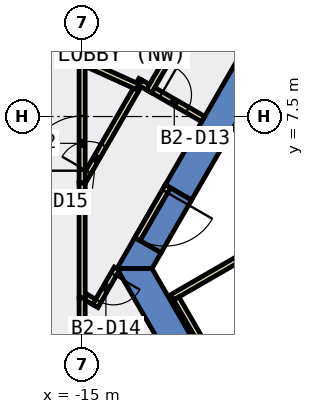
"""IFC4 building model, lengths in metres.
Left out: names, types, materials, properties, quantities, classifications, styles, units other than length and angle.
Written with IfcOpenShell. Run it as: python <this file> out.ifc"""

import sys

from ifc_helpers import new_model, si_unit, direction, frame, frame_2d, origin, place, context, subcontext, project, spatial, polyline, rectangle, outline, extrude, element, fill, save


model = new_model("IFC4")
c1 = context("Model", 3, precision=1e-05, world=origin(), true_north=direction((0.0, 1.0)))
c2 = subcontext(c1, "Body", "Model", "MODEL_VIEW")
j1 = project(units=[si_unit("LENGTHUNIT", "METRE"), si_unit("PLANEANGLEUNIT", "RADIAN")], contexts=[c1])
p1 = place(None, origin())
s1 = spatial("IfcSite", under=j1, at=p1, CompositionType="ELEMENT")
p2 = place(p1, origin())
s2 = spatial("IfcBuilding", under=s1, at=p2, CompositionType="ELEMENT")
p3 = place(p2, frame((0.0, 0.0, -11.0)))
s3 = spatial("IfcBuildingStorey", under=s2, at=p3, CompositionType="ELEMENT", Elevation=-11.0)
p4 = place(p3, frame((0.0, 0.0, -0.42)))
e1 = element("IfcWall", 1, at=p4, inside=s3, PredefinedType="SHEAR", context=c2, shape_type="SweptSolid", body=[
    extrude(outline(polyline([(-12.267, 5.252), (-11.402, 4.752), (-6.351, 13.5), (-6.928, 14.5), (-12.267, 5.252)])), origin(), (0.0, 0.0, 1.0), 5.5),
])
p5 = place(p3, frame((0.0, 0.0, -0.42)))
e2 = element("IfcWall", 2, at=p5, inside=s3, PredefinedType="SHEAR", context=c2, shape_type="SweptSolid", body=[
    extrude(outline(polyline([(-12.402, 3.02), (-13.267, 3.52), (-13.856, 2.5), (-12.702, 2.5), (-12.402, 3.02)])), origin(), (0.0, 0.0, 1.0), 5.5),
])
p6 = place(p3, frame((0.0, 0.0, 3.6)))
e3 = element("IfcWall", 3, at=p6, inside=s3, PredefinedType="SHEAR", context=c2, shape_type="SweptSolid", body=[
    extrude(outline(polyline([(-13.267, 3.52), (-12.402, 3.02), (-11.402, 4.752), (-12.267, 5.252), (-13.267, 3.52)])), origin(), (0.0, 0.0, 1.0), 1.48),
])
p7 = place(p3, frame((0.0, 0.0, -0.42)))
e4 = element("IfcWall", 4, at=p7, inside=s3, PredefinedType="SHEAR", context=c2, shape_type="SweptSolid", body=[
    extrude(outline(polyline([(-13.856, 2.5), (-6.928, -9.5), (-6.351, -8.5), (-12.702, 2.5), (-13.856, 2.5)])), origin(), (0.0, 0.0, 1.0), 5.5),
])
p8 = place(p3, frame((-12.749, 8.417, 0.0), z_axis=(0.0, 0.0, 1.0), x_axis=(0.866010750942, -0.50002537861, 0.0)))
e5 = element("IfcWall", 5, at=p8, inside=s3, PredefinedType="PARTITIONING", context=c2, shape_type="SweptSolid", body=[
    extrude(rectangle(XDim=2.0, YDim=0.2, at=frame_2d((1.0, 0.0))), origin(), (0.0, 0.0, 1.0), 5.05),
])
p9 = place(p8, frame((0.4, 0.0, 0.0)))
e6 = element("IfcOpeningElement", 6, at=p9, cuts=e5, PredefinedType="OPENING", context=c2, shape_type="SweptSolid", body=[
    extrude(rectangle(XDim=1.0, YDim=2.1, at=frame_2d((0.5, 1.05))), frame((0.0, 0.11, 0.0), z_axis=(0.0, -1.0, 0.0), x_axis=(1.0, 0.0, 0.0)), (0.0, 0.0, 1.0), 0.22),
])
p10 = place(p3, frame((-13.856, 2.5, 0.0), z_axis=(0.0, 0.0, 1.0), x_axis=(-0.499831418649, -0.866122712398, 0.0)))
e7 = element("IfcWall", 7, at=p10, inside=s3, PredefinedType="PARTITIONING", context=c2, shape_type="SweptSolid", body=[
    extrude(rectangle(XDim=1.422, YDim=0.2, at=frame_2d((0.711, 0.0))), origin(), (0.0, 0.0, 1.0), 5.05),
])
p11 = place(p10, frame((0.224, 0.0, 0.0)))
e8 = element("IfcOpeningElement", 8, at=p11, cuts=e7, PredefinedType="OPENING", context=c2, shape_type="SweptSolid", body=[
    extrude(rectangle(XDim=1.0, YDim=2.1, at=frame_2d((0.5, 1.05))), frame((0.0, 0.11, 0.0), z_axis=(0.0, -1.0, 0.0), x_axis=(1.0, 0.0, 0.0)), (0.0, 0.0, 1.0), 0.22),
])
p12 = place(p3, frame((-14.604, 1.405, 0.0), z_axis=(0.0, 0.0, 1.0), x_axis=(-0.865410684717, 0.501063216349, 0.0)))
e9 = element("IfcWall", 9, at=p12, inside=s3, PredefinedType="PARTITIONING", context=c2, shape_type="SweptSolid", body=[
    extrude(rectangle(XDim=0.357, YDim=0.2, at=frame_2d((0.179, 0.0))), origin(), (0.0, 0.0, 1.0), 5.05),
])
p13 = place(p3, frame((-15.0, 5.318, 0.0), z_axis=(0.0, 0.0, 1.0), x_axis=(0.500034145141, 0.866005689181, 0.0)))
e10 = element("IfcWall", 10, at=p13, inside=s3, PredefinedType="PARTITIONING", context=c2, shape_type="SweptSolid", body=[
    extrude(rectangle(XDim=3.91, YDim=0.2, at=frame_2d((1.955, 0.0))), origin(), (0.0, 0.0, 1.0), 5.05),
])
p14 = place(p13, frame((0.418, 0.0, 0.0)))
e11 = element("IfcOpeningElement", 11, at=p14, cuts=e10, PredefinedType="OPENING", context=c2, shape_type="SweptSolid", body=[
    extrude(rectangle(XDim=1.0, YDim=2.1, at=frame_2d((0.5, 1.05))), frame((0.0, 0.11, 0.0), z_axis=(0.0, -1.0, 0.0), x_axis=(1.0, 0.0, 0.0)), (0.0, 0.0, 1.0), 0.22),
])
p15 = place(p3, frame((-13.082, 8.609, 0.0), z_axis=(0.0, 0.0, 1.0), x_axis=(0.865998573537, -0.500046468473, 0.0)))
e12 = element("IfcWall", 12, at=p15, inside=s3, PredefinedType="PARTITIONING", context=c2, shape_type="SweptSolid", body=[
    extrude(rectangle(XDim=0.37, YDim=0.2, at=frame_2d((0.185, 0.0))), origin(), (0.0, 0.0, 1.0), 5.05),
])
p16 = place(p3, frame((-15.0, 1.534, 0.0), z_axis=(0.0, 0.0, 1.0), x_axis=(0.0, 1.0, 0.0)))
e13 = element("IfcWall", 13, at=p16, inside=s3, PredefinedType="PARTITIONING", context=c2, shape_type="SweptSolid", body=[
    extrude(rectangle(XDim=3.784, YDim=0.2, at=frame_2d((1.892, 0.0))), origin(), (0.0, 0.0, 1.0), 5.05),
])
p17 = place(p3, frame((-12.799, 8.33, 0.0), z_axis=(0.0, 0.0, 1.0), x_axis=(0.499923440311, 0.86606960103, 0.0)))
e14 = element("IfcWall", 14, at=p17, inside=s3, PredefinedType="PARTITIONING", context=c2, shape_type="SweptSolid", body=[
    extrude(rectangle(XDim=9.534, YDim=0.2, at=frame_2d((4.767, 0.0))), origin(), (0.0, 0.0, 1.0), 5.05),
])
p18 = place(p17, frame((5.766, 0.0, 0.0)))
e15 = element("IfcOpeningElement", 15, at=p18, cuts=e14, PredefinedType="OPENING", context=c2, shape_type="SweptSolid", body=[
    extrude(rectangle(XDim=1.0, YDim=2.1, at=frame_2d((0.5, 1.05))), frame((0.0, 0.11, 0.0), z_axis=(0.0, -1.0, 0.0), x_axis=(1.0, 0.0, 0.0)), (0.0, 0.0, 1.0), 0.22),
])
p19 = place(p3, frame((-15.0, 0.581, 0.0), z_axis=(0.0, 0.0, 1.0), x_axis=(0.0, 1.0, 0.0)))
e16 = element("IfcWall", 16, at=p19, inside=s3, PredefinedType="PARTITIONING", context=c2, shape_type="SweptSolid", body=[
    extrude(rectangle(XDim=0.953, YDim=0.2, at=frame_2d((0.477, 0.0))), origin(), (0.0, 0.0, 1.0), 5.05),
])
p20 = place(p3, frame((-13.46, -2.186, 0.0), z_axis=(0.0, 0.0, 1.0), x_axis=(-0.500060979923, 0.865990194147, 0.0)))
e17 = element("IfcWall", 17, at=p20, inside=s3, PredefinedType="PARTITIONING", context=c2, shape_type="SweptSolid", body=[
    extrude(rectangle(XDim=3.08, YDim=0.2, at=frame_2d((1.54, 0.0))), origin(), (0.0, 0.0, 1.0), 5.05),
])
p21 = place(p20, frame((0.569, 0.0, 0.0)))
e18 = element("IfcOpeningElement", 18, at=p21, cuts=e17, PredefinedType="OPENING", context=c2, shape_type="SweptSolid", body=[
    extrude(rectangle(XDim=1.0, YDim=2.1, at=frame_2d((0.5, 1.05))), frame((0.0, 0.11, 0.0), z_axis=(0.0, -1.0, 0.0), x_axis=(1.0, 0.0, 0.0)), (0.0, 0.0, 1.0), 0.22),
])
p22 = place(p3, frame((-14.909, 9.264, 0.0), z_axis=(0.0, 0.0, 1.0), x_axis=(0.910722060418, -0.41301976789, 0.0)))
e19 = element("IfcWall", 19, at=p22, inside=s3, PredefinedType="PARTITIONING", context=c2, shape_type="SweptSolid", body=[
    extrude(rectangle(XDim=1.903, YDim=0.2, at=frame_2d((0.951, 0.0))), origin(), (0.0, 0.0, 1.0), 5.05),
])
p23 = place(p3, frame((-15.0, 5.318, 0.0), z_axis=(0.0, 0.0, 1.0), x_axis=(0.0, 1.0, 0.0)))
e20 = element("IfcWall", 20, at=p23, inside=s3, PredefinedType="PARTITIONING", context=c2, shape_type="SweptSolid", body=[
    extrude(rectangle(XDim=4.087, YDim=0.2, at=frame_2d((2.043, 0.0))), origin(), (0.0, 0.0, 1.0), 5.05),
])
p24 = place(p23, frame((0.4, 0.0, 0.0)))
e21 = element("IfcOpeningElement", 21, at=p24, cuts=e20, PredefinedType="OPENING", context=c2, shape_type="SweptSolid", body=[
    extrude(rectangle(XDim=1.8, YDim=2.1, at=frame_2d((0.9, 1.05))), frame((0.0, 0.11, 0.0), z_axis=(0.0, -1.0, 0.0), x_axis=(1.0, 0.0, 0.0)), (0.0, 0.0, 1.0), 0.22),
])
p25 = place(p3, frame((-15.0, 9.405, 0.0), z_axis=(0.0, 0.0, 1.0), x_axis=(0.0, 1.0, 0.0)))
e22 = element("IfcWall", 22, at=p25, inside=s3, PredefinedType="PARTITIONING", context=c2, shape_type="SweptSolid", body=[
    extrude(rectangle(XDim=23.495, YDim=0.2, at=frame_2d((11.748, 0.0))), origin(), (0.0, 0.0, 1.0), 5.05),
])
p26 = place(p3, frame((-15.0, -2.706, 0.0), z_axis=(0.0, 0.0, 1.0), x_axis=(0.0, 1.0, 0.0)))
e23 = element("IfcWall", 23, at=p26, inside=s3, PredefinedType="PARTITIONING", context=c2, shape_type="SweptSolid", body=[
    extrude(rectangle(XDim=3.287, YDim=0.2, at=frame_2d((1.644, 0.0))), origin(), (0.0, 0.0, 1.0), 5.05),
])
p27 = place(p3, frame((-12.04, 1.553, 0.0), z_axis=(0.0, 0.0, 1.0), x_axis=(0.866056369097, 0.49994636267, 0.0)))
e24 = element("IfcWall", 24, at=p27, inside=s3, PredefinedType="PARTITIONING", context=c2, shape_type="SweptSolid", body=[
    extrude(rectangle(XDim=2.8, YDim=0.2, at=frame_2d((1.4, 0.0))), origin(), (0.0, 0.0, 1.0), 5.05),
])
p28 = place(p3, frame((-10.603, -0.735, 0.0), z_axis=(0.0, 0.0, 1.0), x_axis=(-0.499925626596, 0.866068339032, 0.0)))
e25 = element("IfcWall", 25, at=p28, inside=s3, PredefinedType="PARTITIONING", context=c2, shape_type="SweptSolid", body=[
    extrude(rectangle(XDim=2.601, YDim=0.2, at=frame_2d((1.3, 0.0))), origin(), (0.0, 0.0, 1.0), 5.05),
])
p29 = place(p3, frame((-12.18, 5.202, 0.0), z_axis=(0.0, 0.0, 1.0), x_axis=(-0.50002537861, -0.866010750942, 0.0)))
e26 = element("IfcWall", 26, at=p29, inside=s3, PredefinedType="PARTITIONING", context=c2, shape_type="SweptSolid", body=[
    extrude(rectangle(XDim=2.0, YDim=0.2, at=frame_2d((1.0, 0.0))), origin(), (0.0, 0.0, 1.0), 2.4),
])
p30 = place(p29, frame((0.19, 0.0, 0.0)))
e27 = element("IfcOpeningElement", 27, at=p30, cuts=e26, PredefinedType="OPENING", context=c2, shape_type="SweptSolid", body=[
    extrude(rectangle(XDim=1.8, YDim=2.1, at=frame_2d((0.9, 1.05))), frame((0.0, 0.11, 0.0), z_axis=(0.0, -1.0, 0.0), x_axis=(1.0, 0.0, 0.0)), (0.0, 0.0, 1.0), 0.22),
])
p31 = place(p9, origin())
e28 = element("IfcDoor", 28, at=p31, inside=s3, OperationType="SINGLE_SWING_LEFT", PredefinedType="DOOR", context=c2, shape_type="SweptSolid", body=[
    extrude(rectangle(XDim=1.0, YDim=2.1, at=frame_2d((0.5, 1.05))), frame((0.0, 0.025, 0.0), z_axis=(0.0, -1.0, 0.0), x_axis=(1.0, 0.0, 0.0)), (0.0, 0.0, 1.0), 0.05),
])
fill(e6, e28)
p32 = place(p11, origin())
e29 = element("IfcDoor", 29, at=p32, inside=s3, OperationType="SINGLE_SWING_RIGHT", PredefinedType="DOOR", context=c2, shape_type="SweptSolid", body=[
    extrude(rectangle(XDim=1.0, YDim=2.1, at=frame_2d((0.5, 1.05))), frame((0.0, 0.025, 0.0), z_axis=(0.0, -1.0, 0.0), x_axis=(1.0, 0.0, 0.0)), (0.0, 0.0, 1.0), 0.05),
])
fill(e8, e29)
p33 = place(p14, origin())
e30 = element("IfcDoor", 30, at=p33, inside=s3, OperationType="SINGLE_SWING_LEFT", PredefinedType="DOOR", context=c2, shape_type="SweptSolid", body=[
    extrude(rectangle(XDim=1.0, YDim=2.1, at=frame_2d((0.5, 1.05))), frame((0.0, 0.025, 0.0), z_axis=(0.0, -1.0, 0.0), x_axis=(1.0, 0.0, 0.0)), (0.0, 0.0, 1.0), 0.05),
])
fill(e11, e30)
p34 = place(p24, origin())
e31 = element("IfcDoor", 31, at=p34, inside=s3, OperationType="DOUBLE_DOOR_SINGLE_SWING", PredefinedType="DOOR", context=c2, shape_type="SweptSolid", body=[
    extrude(rectangle(XDim=1.8, YDim=2.1, at=frame_2d((0.9, 1.05))), frame((0.0, 0.025, 0.0), z_axis=(0.0, -1.0, 0.0), x_axis=(1.0, 0.0, 0.0)), (0.0, 0.0, 1.0), 0.05),
])
fill(e21, e31)
p35 = place(p30, origin())
e32 = element("IfcDoor", 32, at=p35, inside=s3, OperationType="DOUBLE_DOOR_SINGLE_SWING", PredefinedType="DOOR", context=c2, shape_type="SweptSolid", body=[
    extrude(rectangle(XDim=1.8, YDim=2.1, at=frame_2d((0.9, 1.05))), frame((0.0, 0.025, 0.0), z_axis=(0.0, -1.0, 0.0), x_axis=(1.0, 0.0, 0.0)), (0.0, 0.0, 1.0), 0.05),
])
fill(e27, e32)
save(model, sys.argv[1])
